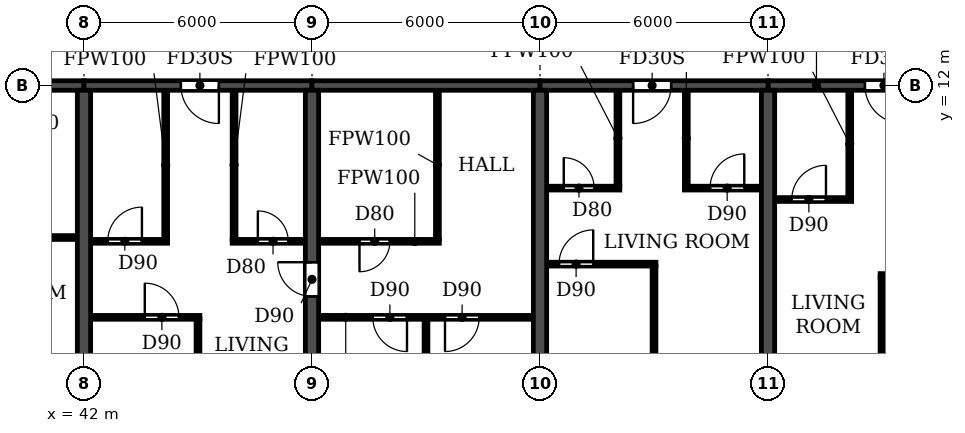
"""IFC4 building model, lengths in metres.
Left out: names, types, materials, properties, quantities, classifications, styles, units other than length and angle.
Written with IfcOpenShell. Run it as: python <this file> out.ifc"""

import sys

from ifc_helpers import new_model, si_unit, direction, frame, frame_2d, origin, place, context, subcontext, project, spatial, rectangle, extrude, element, fill, save


model = new_model("IFC4")
c1 = context("Model", 3, precision=1e-05, world=origin(), true_north=direction((0.0, 1.0)))
c2 = subcontext(c1, "Body", "Model", "MODEL_VIEW")
j1 = project(units=[si_unit("LENGTHUNIT", "METRE"), si_unit("PLANEANGLEUNIT", "RADIAN")], contexts=[c1])
p1 = place(None, origin())
s1 = spatial("IfcSite", under=j1, at=p1, CompositionType="ELEMENT")
p2 = place(p1, origin())
s2 = spatial("IfcBuilding", under=s1, at=p2, CompositionType="ELEMENT")
p3 = place(p2, frame((0.0, 0.0, 102.6)))
s3 = spatial("IfcBuildingStorey", under=s2, at=p3, CompositionType="ELEMENT", Elevation=102.6)
p4 = place(p3, frame((42.0, 0.2, 0.0), z_axis=(0.0, 0.0, 1.0), x_axis=(0.0, 1.0, 0.0)))
e1 = element("IfcWall", 1, at=p4, inside=s3, PredefinedType="SHEAR", context=c2, shape_type="SweptSolid", body=[
    extrude(rectangle(XDim=11.675, YDim=0.35, at=frame_2d((5.837, 0.0))), origin(), (0.0, 0.0, 1.0), 3.0),
])
p5 = place(p3, frame((48.0, 0.2, 0.0), z_axis=(0.0, 0.0, 1.0), x_axis=(0.0, 1.0, 0.0)))
e2 = element("IfcWall", 2, at=p5, inside=s3, PredefinedType="SHEAR", context=c2, shape_type="SweptSolid", body=[
    extrude(rectangle(XDim=11.675, YDim=0.35, at=frame_2d((5.837, 0.0))), origin(), (0.0, 0.0, 1.0), 3.0),
])
p6 = place(p5, frame((6.25, 0.0, 0.0)))
e3 = element("IfcOpeningElement", 3, at=p6, cuts=e2, PredefinedType="OPENING", context=c2, shape_type="SweptSolid", body=[
    extrude(rectangle(XDim=0.9, YDim=2.1, at=frame_2d((0.45, 1.05))), frame((0.0, 0.185, 0.0), z_axis=(0.0, -1.0, 0.0), x_axis=(1.0, 0.0, 0.0)), (0.0, 0.0, 1.0), 0.37),
])
for number, where, z_axis, x_axis in (
    (4, (54.0, 0.2, 0.0), (0.0, 0.0, 1.0), (0.0, 1.0, 0.0)),
    (5, (60.0, 0.2, 0.0), (0.0, 0.0, 1.0), (0.0, 1.0, 0.0)),
):
    element("IfcWall", number, at=place(p3, frame(where, z_axis=z_axis, x_axis=x_axis)), inside=s3, PredefinedType="SHEAR", context=c2, shape_type="SweptSolid", body=[
        extrude(rectangle(XDim=11.675, YDim=0.35, at=frame_2d((5.837, 0.0))), origin(), (0.0, 0.0, 1.0), 3.0),
    ])
p7 = place(p3, frame((36.0, 12.0, 0.0), z_axis=(0.0, 0.0, 1.0), x_axis=(1.0, 0.0, 0.0)))
e6 = element("IfcWall", 6, at=p7, inside=s3, PredefinedType="SHEAR", context=c2, shape_type="SweptSolid", body=[
    extrude(rectangle(XDim=6.0, YDim=0.25, at=frame_2d((3.0, 0.0))), origin(), (0.0, 0.0, 1.0), 2.4),
])
p8 = place(p7, frame((2.45, 0.0, 0.0)))
e7 = element("IfcOpeningElement", 7, at=p8, cuts=e6, PredefinedType="OPENING", context=c2, shape_type="SweptSolid", body=[
    extrude(rectangle(XDim=1.0, YDim=2.1, at=frame_2d((0.5, 1.05))), frame((0.0, 0.135, 0.0), z_axis=(0.0, -1.0, 0.0), x_axis=(1.0, 0.0, 0.0)), (0.0, 0.0, 1.0), 0.27),
])
p9 = place(p3, frame((42.0, 12.0, 0.0), z_axis=(0.0, 0.0, 1.0), x_axis=(1.0, 0.0, 0.0)))
e8 = element("IfcWall", 8, at=p9, inside=s3, PredefinedType="SHEAR", context=c2, shape_type="SweptSolid", body=[
    extrude(rectangle(XDim=6.0, YDim=0.25, at=frame_2d((3.0, 0.0))), origin(), (0.0, 0.0, 1.0), 2.4),
])
p10 = place(p9, frame((2.55, 0.0, 0.0)))
e9 = element("IfcOpeningElement", 9, at=p10, cuts=e8, PredefinedType="OPENING", context=c2, shape_type="SweptSolid", body=[
    extrude(rectangle(XDim=1.0, YDim=2.1, at=frame_2d((0.5, 1.05))), frame((0.0, 0.135, 0.0), z_axis=(0.0, -1.0, 0.0), x_axis=(1.0, 0.0, 0.0)), (0.0, 0.0, 1.0), 0.27),
])
p11 = place(p3, frame((48.0, 12.0, 0.0), z_axis=(0.0, 0.0, 1.0), x_axis=(1.0, 0.0, 0.0)))
e10 = element("IfcWall", 10, at=p11, inside=s3, PredefinedType="SHEAR", context=c2, shape_type="SweptSolid", body=[
    extrude(rectangle(XDim=6.0, YDim=0.25, at=frame_2d((3.0, 0.0))), origin(), (0.0, 0.0, 1.0), 2.4),
])
p12 = place(p3, frame((54.0, 12.0, 0.0), z_axis=(0.0, 0.0, 1.0), x_axis=(1.0, 0.0, 0.0)))
e11 = element("IfcWall", 11, at=p12, inside=s3, PredefinedType="SHEAR", context=c2, shape_type="SweptSolid", body=[
    extrude(rectangle(XDim=6.0, YDim=0.25, at=frame_2d((3.0, 0.0))), origin(), (0.0, 0.0, 1.0), 2.4),
])
p13 = place(p12, frame((2.45, 0.0, 0.0)))
e12 = element("IfcOpeningElement", 12, at=p13, cuts=e11, PredefinedType="OPENING", context=c2, shape_type="SweptSolid", body=[
    extrude(rectangle(XDim=1.0, YDim=2.1, at=frame_2d((0.5, 1.05))), frame((0.0, 0.135, 0.0), z_axis=(0.0, -1.0, 0.0), x_axis=(1.0, 0.0, 0.0)), (0.0, 0.0, 1.0), 0.27),
])
p14 = place(p3, frame((60.0, 12.0, 0.0), z_axis=(0.0, 0.0, 1.0), x_axis=(1.0, 0.0, 0.0)))
e13 = element("IfcWall", 13, at=p14, inside=s3, PredefinedType="SHEAR", context=c2, shape_type="SweptSolid", body=[
    extrude(rectangle(XDim=6.0, YDim=0.25, at=frame_2d((3.0, 0.0))), origin(), (0.0, 0.0, 1.0), 2.4),
])
p15 = place(p14, frame((2.55, 0.0, 0.0)))
e14 = element("IfcOpeningElement", 14, at=p15, cuts=e13, PredefinedType="OPENING", context=c2, shape_type="SweptSolid", body=[
    extrude(rectangle(XDim=1.0, YDim=2.1, at=frame_2d((0.5, 1.05))), frame((0.0, 0.135, 0.0), z_axis=(0.0, -1.0, 0.0), x_axis=(1.0, 0.0, 0.0)), (0.0, 0.0, 1.0), 0.27),
])
p16 = place(p3, frame((42.185, 5.9, 0.0), z_axis=(0.0, 0.0, 1.0), x_axis=(1.0, 0.0, 0.0)))
e15 = element("IfcWall", 15, at=p16, inside=s3, PredefinedType="PARTITIONING", context=c2, shape_type="SweptSolid", body=[
    extrude(rectangle(XDim=2.865, YDim=0.1, at=frame_2d((1.433, 0.0))), origin(), (0.0, 0.0, 1.0), 3.0),
])
p17 = place(p16, frame((1.415, 0.0, 0.0)))
e16 = element("IfcOpeningElement", 16, at=p17, cuts=e15, PredefinedType="OPENING", context=c2, shape_type="SweptSolid", body=[
    extrude(rectangle(XDim=0.9, YDim=2.1, at=frame_2d((0.45, 1.05))), frame((0.0, 0.06, 0.0), z_axis=(0.0, -1.0, 0.0), x_axis=(1.0, 0.0, 0.0)), (0.0, 0.0, 1.0), 0.12),
])
p18 = place(p3, frame((48.185, 5.9, 0.0), z_axis=(0.0, 0.0, 1.0), x_axis=(1.0, 0.0, 0.0)))
e17 = element("IfcWall", 17, at=p18, inside=s3, PredefinedType="PARTITIONING", context=c2, shape_type="SweptSolid", body=[
    extrude(rectangle(XDim=5.63, YDim=0.1, at=frame_2d((2.815, 0.0))), origin(), (0.0, 0.0, 1.0), 3.0),
])
p19 = place(p18, frame((1.415, 0.0, 0.0)))
e18 = element("IfcOpeningElement", 18, at=p19, cuts=e17, PredefinedType="OPENING", context=c2, shape_type="SweptSolid", body=[
    extrude(rectangle(XDim=0.9, YDim=2.1, at=frame_2d((0.45, 1.05))), frame((0.0, 0.06, 0.0), z_axis=(0.0, -1.0, 0.0), x_axis=(1.0, 0.0, 0.0)), (0.0, 0.0, 1.0), 0.12),
])
p20 = place(p18, frame((3.315, 0.0, 0.0)))
e19 = element("IfcOpeningElement", 19, at=p20, cuts=e17, PredefinedType="OPENING", context=c2, shape_type="SweptSolid", body=[
    extrude(rectangle(XDim=0.9, YDim=2.1, at=frame_2d((0.45, 1.05))), frame((0.0, 0.06, 0.0), z_axis=(0.0, -1.0, 0.0), x_axis=(1.0, 0.0, 0.0)), (0.0, 0.0, 1.0), 0.12),
])
p21 = place(p3, frame((62.95, 7.0, 0.0), z_axis=(0.0, 0.0, 1.0), x_axis=(1.0, 0.0, 0.0)))
e20 = element("IfcWall", 20, at=p21, inside=s3, PredefinedType="PARTITIONING", context=c2, shape_type="SweptSolid", body=[
    extrude(rectangle(XDim=2.865, YDim=0.1, at=frame_2d((1.433, 0.0))), origin(), (0.0, 0.0, 1.0), 3.0),
])
p22 = place(p21, frame((0.55, 0.0, 0.0)))
e21 = element("IfcOpeningElement", 21, at=p22, cuts=e20, PredefinedType="OPENING", context=c2, shape_type="SweptSolid", body=[
    extrude(rectangle(XDim=0.9, YDim=2.1, at=frame_2d((0.45, 1.05))), frame((0.0, 0.06, 0.0), z_axis=(0.0, -1.0, 0.0), x_axis=(1.0, 0.0, 0.0)), (0.0, 0.0, 1.0), 0.12),
])
p23 = place(p3, frame((54.185, 7.3, 0.0), z_axis=(0.0, 0.0, 1.0), x_axis=(1.0, 0.0, 0.0)))
e22 = element("IfcWall", 22, at=p23, inside=s3, PredefinedType="PARTITIONING", context=c2, shape_type="SweptSolid", body=[
    extrude(rectangle(XDim=2.865, YDim=0.1, at=frame_2d((1.433, 0.0))), origin(), (0.0, 0.0, 1.0), 3.0),
])
p24 = place(p23, frame((0.315, 0.0, 0.0)))
e23 = element("IfcOpeningElement", 23, at=p24, cuts=e22, PredefinedType="OPENING", context=c2, shape_type="SweptSolid", body=[
    extrude(rectangle(XDim=0.9, YDim=2.1, at=frame_2d((0.45, 1.05))), frame((0.0, 0.06, 0.0), z_axis=(0.0, -1.0, 0.0), x_axis=(1.0, 0.0, 0.0)), (0.0, 0.0, 1.0), 0.12),
])
p25 = place(p3, frame((42.185, 7.9, 0.0), z_axis=(0.0, 0.0, 1.0), x_axis=(1.0, 0.0, 0.0)))
e24 = element("IfcWall", 24, at=p25, inside=s3, PredefinedType="PARTITIONING", context=c2, shape_type="SweptSolid", body=[
    extrude(rectangle(XDim=2.015, YDim=0.1, at=frame_2d((1.007, 0.0))), origin(), (0.0, 0.0, 1.0), 3.0),
])
p26 = place(p25, frame((0.44, 0.0, 0.0)))
e25 = element("IfcOpeningElement", 25, at=p26, cuts=e24, PredefinedType="OPENING", context=c2, shape_type="SweptSolid", body=[
    extrude(rectangle(XDim=0.9, YDim=2.1, at=frame_2d((0.45, 1.05))), frame((0.0, 0.06, 0.0), z_axis=(0.0, -1.0, 0.0), x_axis=(1.0, 0.0, 0.0)), (0.0, 0.0, 1.0), 0.12),
])
p27 = place(p3, frame((45.9, 7.9, 0.0), z_axis=(0.0, 0.0, 1.0), x_axis=(1.0, 0.0, 0.0)))
e26 = element("IfcWall", 26, at=p27, inside=s3, PredefinedType="PARTITIONING", context=c2, shape_type="SweptSolid", body=[
    extrude(rectangle(XDim=1.915, YDim=0.1, at=frame_2d((0.958, 0.0))), origin(), (0.0, 0.0, 1.0), 3.0),
])
p28 = place(p27, frame((0.675, 0.0, 0.0)))
e27 = element("IfcOpeningElement", 27, at=p28, cuts=e26, PredefinedType="OPENING", context=c2, shape_type="SweptSolid", body=[
    extrude(rectangle(XDim=0.8, YDim=2.1, at=frame_2d((0.4, 1.05))), frame((0.0, 0.06, 0.0), z_axis=(0.0, -1.0, 0.0), x_axis=(1.0, 0.0, 0.0)), (0.0, 0.0, 1.0), 0.12),
])
p29 = place(p3, frame((48.185, 7.9, 0.0), z_axis=(0.0, 0.0, 1.0), x_axis=(1.0, 0.0, 0.0)))
e28 = element("IfcWall", 28, at=p29, inside=s3, PredefinedType="PARTITIONING", context=c2, shape_type="SweptSolid", body=[
    extrude(rectangle(XDim=3.165, YDim=0.1, at=frame_2d((1.583, 0.0))), origin(), (0.0, 0.0, 1.0), 3.0),
])
p30 = place(p29, frame((1.065, 0.0, 0.0)))
e29 = element("IfcOpeningElement", 29, at=p30, cuts=e28, PredefinedType="OPENING", context=c2, shape_type="SweptSolid", body=[
    extrude(rectangle(XDim=0.8, YDim=2.1, at=frame_2d((0.4, 1.05))), frame((0.0, 0.06, 0.0), z_axis=(0.0, -1.0, 0.0), x_axis=(1.0, 0.0, 0.0)), (0.0, 0.0, 1.0), 0.12),
])
p31 = place(p3, frame((39.8, 8.0, 0.0), z_axis=(0.0, 0.0, 1.0), x_axis=(1.0, 0.0, 0.0)))
e30 = element("IfcWall", 30, at=p31, inside=s3, PredefinedType="PARTITIONING", context=c2, shape_type="SweptSolid", body=[
    extrude(rectangle(XDim=2.015, YDim=0.1, at=frame_2d((1.007, 0.0))), origin(), (0.0, 0.0, 1.0), 3.0),
])
p32 = place(p3, frame((60.185, 9.0, 0.0), z_axis=(0.0, 0.0, 1.0), x_axis=(1.0, 0.0, 0.0)))
e31 = element("IfcWall", 31, at=p32, inside=s3, PredefinedType="PARTITIONING", context=c2, shape_type="SweptSolid", body=[
    extrude(rectangle(XDim=2.015, YDim=0.1, at=frame_2d((1.007, 0.0))), origin(), (0.0, 0.0, 1.0), 3.0),
])
p33 = place(p32, frame((0.44, 0.0, 0.0)))
e32 = element("IfcOpeningElement", 32, at=p33, cuts=e31, PredefinedType="OPENING", context=c2, shape_type="SweptSolid", body=[
    extrude(rectangle(XDim=0.9, YDim=2.1, at=frame_2d((0.45, 1.05))), frame((0.0, 0.06, 0.0), z_axis=(0.0, -1.0, 0.0), x_axis=(1.0, 0.0, 0.0)), (0.0, 0.0, 1.0), 0.12),
])
p34 = place(p3, frame((54.185, 9.3, 0.0), z_axis=(0.0, 0.0, 1.0), x_axis=(1.0, 0.0, 0.0)))
e33 = element("IfcWall", 33, at=p34, inside=s3, PredefinedType="PARTITIONING", context=c2, shape_type="SweptSolid", body=[
    extrude(rectangle(XDim=1.915, YDim=0.1, at=frame_2d((0.958, 0.0))), origin(), (0.0, 0.0, 1.0), 3.0),
])
p35 = place(p34, frame((0.44, 0.0, 0.0)))
e34 = element("IfcOpeningElement", 34, at=p35, cuts=e33, PredefinedType="OPENING", context=c2, shape_type="SweptSolid", body=[
    extrude(rectangle(XDim=0.8, YDim=2.1, at=frame_2d((0.4, 1.05))), frame((0.0, 0.06, 0.0), z_axis=(0.0, -1.0, 0.0), x_axis=(1.0, 0.0, 0.0)), (0.0, 0.0, 1.0), 0.12),
])
p36 = place(p3, frame((57.8, 9.3, 0.0), z_axis=(0.0, 0.0, 1.0), x_axis=(1.0, 0.0, 0.0)))
e35 = element("IfcWall", 35, at=p36, inside=s3, PredefinedType="PARTITIONING", context=c2, shape_type="SweptSolid", body=[
    extrude(rectangle(XDim=2.015, YDim=0.1, at=frame_2d((1.007, 0.0))), origin(), (0.0, 0.0, 1.0), 3.0),
])
p37 = place(p36, frame((0.675, 0.0, 0.0)))
e36 = element("IfcOpeningElement", 36, at=p37, cuts=e35, PredefinedType="OPENING", context=c2, shape_type="SweptSolid", body=[
    extrude(rectangle(XDim=0.9, YDim=2.1, at=frame_2d((0.45, 1.05))), frame((0.0, 0.06, 0.0), z_axis=(0.0, -1.0, 0.0), x_axis=(1.0, 0.0, 0.0)), (0.0, 0.0, 1.0), 0.12),
])
p38 = place(p3, frame((44.15, 7.95, 0.0), z_axis=(0.0, 0.0, 1.0), x_axis=(0.0, 1.0, 0.0)))
e37 = element("IfcWall", 37, at=p38, inside=s3, PredefinedType="PARTITIONING", context=c2, shape_type="SweptSolid", body=[
    extrude(rectangle(XDim=3.915, YDim=0.1, at=frame_2d((1.958, 0.0))), origin(), (0.0, 0.0, 1.0), 3.0),
])
p39 = place(p3, frame((45.0, 0.06, 0.0), z_axis=(0.0, 0.0, 1.0), x_axis=(0.0, 1.0, 0.0)))
e38 = element("IfcWall", 38, at=p39, inside=s3, PredefinedType="PARTITIONING", context=c2, shape_type="SweptSolid", body=[
    extrude(rectangle(XDim=5.79, YDim=0.1, at=frame_2d((2.895, 0.0))), origin(), (0.0, 0.0, 1.0), 3.0),
])
p40 = place(p3, frame((45.95, 7.95, 0.0), z_axis=(0.0, 0.0, 1.0), x_axis=(0.0, 1.0, 0.0)))
e39 = element("IfcWall", 39, at=p40, inside=s3, PredefinedType="PARTITIONING", context=c2, shape_type="SweptSolid", body=[
    extrude(rectangle(XDim=3.915, YDim=0.1, at=frame_2d((1.958, 0.0))), origin(), (0.0, 0.0, 1.0), 3.0),
])
p41 = place(p3, frame((51.0, 0.06, 0.0), z_axis=(0.0, 0.0, 1.0), x_axis=(0.0, 1.0, 0.0)))
e40 = element("IfcWall", 40, at=p41, inside=s3, PredefinedType="PARTITIONING", context=c2, shape_type="SweptSolid", body=[
    extrude(rectangle(XDim=5.79, YDim=0.1, at=frame_2d((2.895, 0.0))), origin(), (0.0, 0.0, 1.0), 3.0),
])
p42 = place(p3, frame((51.3, 7.95, 0.0), z_axis=(0.0, 0.0, 1.0), x_axis=(0.0, 1.0, 0.0)))
e41 = element("IfcWall", 41, at=p42, inside=s3, PredefinedType="PARTITIONING", context=c2, shape_type="SweptSolid", body=[
    extrude(rectangle(XDim=3.915, YDim=0.1, at=frame_2d((1.958, 0.0))), origin(), (0.0, 0.0, 1.0), 3.0),
])
p43 = place(p3, frame((56.05, 9.35, 0.0), z_axis=(0.0, 0.0, 1.0), x_axis=(0.0, 1.0, 0.0)))
e42 = element("IfcWall", 42, at=p43, inside=s3, PredefinedType="PARTITIONING", context=c2, shape_type="SweptSolid", body=[
    extrude(rectangle(XDim=2.515, YDim=0.1, at=frame_2d((1.257, 0.0))), origin(), (0.0, 0.0, 1.0), 3.0),
])
p44 = place(p3, frame((57.0, 0.06, 0.0), z_axis=(0.0, 0.0, 1.0), x_axis=(0.0, 1.0, 0.0)))
e43 = element("IfcWall", 43, at=p44, inside=s3, PredefinedType="PARTITIONING", context=c2, shape_type="SweptSolid", body=[
    extrude(rectangle(XDim=7.19, YDim=0.1, at=frame_2d((3.595, 0.0))), origin(), (0.0, 0.0, 1.0), 3.0),
])
p45 = place(p3, frame((57.85, 9.35, 0.0), z_axis=(0.0, 0.0, 1.0), x_axis=(0.0, 1.0, 0.0)))
e44 = element("IfcWall", 44, at=p45, inside=s3, PredefinedType="PARTITIONING", context=c2, shape_type="SweptSolid", body=[
    extrude(rectangle(XDim=2.515, YDim=0.1, at=frame_2d((1.257, 0.0))), origin(), (0.0, 0.0, 1.0), 3.0),
])
p46 = place(p3, frame((62.15, 9.05, 0.0), z_axis=(0.0, 0.0, 1.0), x_axis=(0.0, 1.0, 0.0)))
e45 = element("IfcWall", 45, at=p46, inside=s3, PredefinedType="PARTITIONING", context=c2, shape_type="SweptSolid", body=[
    extrude(rectangle(XDim=2.815, YDim=0.1, at=frame_2d((1.407, 0.0))), origin(), (0.0, 0.0, 1.0), 3.0),
])
p47 = place(p3, frame((63.0, 0.06, 0.0), z_axis=(0.0, 0.0, 1.0), x_axis=(0.0, 1.0, 0.0)))
e46 = element("IfcWall", 46, at=p47, inside=s3, PredefinedType="PARTITIONING", context=c2, shape_type="SweptSolid", body=[
    extrude(rectangle(XDim=6.89, YDim=0.1, at=frame_2d((3.445, 0.0))), origin(), (0.0, 0.0, 1.0), 3.0),
])
p48 = place(p30, frame((0.8, 0.0, 0.0), z_axis=(0.0, 0.0, 1.0), x_axis=(-1.0, 0.0, 0.0)))
e47 = element("IfcDoor", 47, at=p48, inside=s3, OperationType="SINGLE_SWING_RIGHT", PredefinedType="DOOR", context=c2, shape_type="SweptSolid", body=[
    extrude(rectangle(XDim=0.8, YDim=2.1, at=frame_2d((0.4, 1.05))), frame((0.0, 0.025, 0.0), z_axis=(0.0, -1.0, 0.0), x_axis=(1.0, 0.0, 0.0)), (0.0, 0.0, 1.0), 0.05),
])
fill(e29, e47)
p49 = place(p19, frame((0.9, 0.0, 0.0), z_axis=(0.0, 0.0, 1.0), x_axis=(-1.0, 0.0, 0.0)))
e48 = element("IfcDoor", 48, at=p49, inside=s3, OperationType="SINGLE_SWING_LEFT", PredefinedType="DOOR", context=c2, shape_type="SweptSolid", body=[
    extrude(rectangle(XDim=0.9, YDim=2.1, at=frame_2d((0.45, 1.05))), frame((0.0, 0.025, 0.0), z_axis=(0.0, -1.0, 0.0), x_axis=(1.0, 0.0, 0.0)), (0.0, 0.0, 1.0), 0.05),
])
fill(e18, e48)
p50 = place(p20, frame((0.9, 0.0, 0.0), z_axis=(0.0, 0.0, 1.0), x_axis=(-1.0, 0.0, 0.0)))
e49 = element("IfcDoor", 49, at=p50, inside=s3, OperationType="SINGLE_SWING_RIGHT", PredefinedType="DOOR", context=c2, shape_type="SweptSolid", body=[
    extrude(rectangle(XDim=0.9, YDim=2.1, at=frame_2d((0.45, 1.05))), frame((0.0, 0.025, 0.0), z_axis=(0.0, -1.0, 0.0), x_axis=(1.0, 0.0, 0.0)), (0.0, 0.0, 1.0), 0.05),
])
fill(e19, e49)
p51 = place(p26, origin())
e50 = element("IfcDoor", 50, at=p51, inside=s3, OperationType="SINGLE_SWING_RIGHT", PredefinedType="DOOR", context=c2, shape_type="SweptSolid", body=[
    extrude(rectangle(XDim=0.9, YDim=2.1, at=frame_2d((0.45, 1.05))), frame((0.0, 0.025, 0.0), z_axis=(0.0, -1.0, 0.0), x_axis=(1.0, 0.0, 0.0)), (0.0, 0.0, 1.0), 0.05),
])
fill(e25, e50)
p52 = place(p17, origin())
e51 = element("IfcDoor", 51, at=p52, inside=s3, OperationType="SINGLE_SWING_LEFT", PredefinedType="DOOR", context=c2, shape_type="SweptSolid", body=[
    extrude(rectangle(XDim=0.9, YDim=2.1, at=frame_2d((0.45, 1.05))), frame((0.0, 0.025, 0.0), z_axis=(0.0, -1.0, 0.0), x_axis=(1.0, 0.0, 0.0)), (0.0, 0.0, 1.0), 0.05),
])
fill(e16, e51)
p53 = place(p10, frame((1.0, 0.0, 0.0), z_axis=(0.0, 0.0, 1.0), x_axis=(-1.0, 0.0, 0.0)))
e52 = element("IfcDoor", 52, at=p53, inside=s3, OperationType="SINGLE_SWING_LEFT", PredefinedType="DOOR", context=c2, shape_type="SweptSolid", body=[
    extrude(rectangle(XDim=1.0, YDim=2.1, at=frame_2d((0.5, 1.05))), frame((0.0, 0.025, 0.0), z_axis=(0.0, -1.0, 0.0), x_axis=(1.0, 0.0, 0.0)), (0.0, 0.0, 1.0), 0.05),
])
fill(e9, e52)
p54 = place(p28, origin())
e53 = element("IfcDoor", 53, at=p54, inside=s3, OperationType="SINGLE_SWING_LEFT", PredefinedType="DOOR", context=c2, shape_type="SweptSolid", body=[
    extrude(rectangle(XDim=0.8, YDim=2.1, at=frame_2d((0.4, 1.05))), frame((0.0, 0.025, 0.0), z_axis=(0.0, -1.0, 0.0), x_axis=(1.0, 0.0, 0.0)), (0.0, 0.0, 1.0), 0.05),
])
fill(e27, e53)
p55 = place(p6, origin())
e54 = element("IfcDoor", 54, at=p55, inside=s3, OperationType="SINGLE_SWING_RIGHT", PredefinedType="DOOR", context=c2, shape_type="SweptSolid", body=[
    extrude(rectangle(XDim=0.9, YDim=2.1, at=frame_2d((0.45, 1.05))), frame((0.0, 0.025, 0.0), z_axis=(0.0, -1.0, 0.0), x_axis=(1.0, 0.0, 0.0)), (0.0, 0.0, 1.0), 0.05),
])
fill(e3, e54)
p56 = place(p24, origin())
e55 = element("IfcDoor", 55, at=p56, inside=s3, OperationType="SINGLE_SWING_RIGHT", PredefinedType="DOOR", context=c2, shape_type="SweptSolid", body=[
    extrude(rectangle(XDim=0.9, YDim=2.1, at=frame_2d((0.45, 1.05))), frame((0.0, 0.025, 0.0), z_axis=(0.0, -1.0, 0.0), x_axis=(1.0, 0.0, 0.0)), (0.0, 0.0, 1.0), 0.05),
])
fill(e23, e55)
p57 = place(p35, origin())
e56 = element("IfcDoor", 56, at=p57, inside=s3, OperationType="SINGLE_SWING_LEFT", PredefinedType="DOOR", context=c2, shape_type="SweptSolid", body=[
    extrude(rectangle(XDim=0.8, YDim=2.1, at=frame_2d((0.4, 1.05))), frame((0.0, 0.025, 0.0), z_axis=(0.0, -1.0, 0.0), x_axis=(1.0, 0.0, 0.0)), (0.0, 0.0, 1.0), 0.05),
])
fill(e34, e56)
p58 = place(p13, frame((1.0, 0.0, 0.0), z_axis=(0.0, 0.0, 1.0), x_axis=(-1.0, 0.0, 0.0)))
e57 = element("IfcDoor", 57, at=p58, inside=s3, OperationType="SINGLE_SWING_RIGHT", PredefinedType="DOOR", context=c2, shape_type="SweptSolid", body=[
    extrude(rectangle(XDim=1.0, YDim=2.1, at=frame_2d((0.5, 1.05))), frame((0.0, 0.025, 0.0), z_axis=(0.0, -1.0, 0.0), x_axis=(1.0, 0.0, 0.0)), (0.0, 0.0, 1.0), 0.05),
])
fill(e12, e57)
p59 = place(p37, origin())
e58 = element("IfcDoor", 58, at=p59, inside=s3, OperationType="SINGLE_SWING_RIGHT", PredefinedType="DOOR", context=c2, shape_type="SweptSolid", body=[
    extrude(rectangle(XDim=0.9, YDim=2.1, at=frame_2d((0.45, 1.05))), frame((0.0, 0.025, 0.0), z_axis=(0.0, -1.0, 0.0), x_axis=(1.0, 0.0, 0.0)), (0.0, 0.0, 1.0), 0.05),
])
fill(e36, e58)
p60 = place(p33, origin())
e59 = element("IfcDoor", 59, at=p60, inside=s3, OperationType="SINGLE_SWING_RIGHT", PredefinedType="DOOR", context=c2, shape_type="SweptSolid", body=[
    extrude(rectangle(XDim=0.9, YDim=2.1, at=frame_2d((0.45, 1.05))), frame((0.0, 0.025, 0.0), z_axis=(0.0, -1.0, 0.0), x_axis=(1.0, 0.0, 0.0)), (0.0, 0.0, 1.0), 0.05),
])
fill(e32, e59)
p61 = place(p15, frame((1.0, 0.0, 0.0), z_axis=(0.0, 0.0, 1.0), x_axis=(-1.0, 0.0, 0.0)))
e60 = element("IfcDoor", 60, at=p61, inside=s3, OperationType="SINGLE_SWING_LEFT", PredefinedType="DOOR", context=c2, shape_type="SweptSolid", body=[
    extrude(rectangle(XDim=1.0, YDim=2.1, at=frame_2d((0.5, 1.05))), frame((0.0, 0.025, 0.0), z_axis=(0.0, -1.0, 0.0), x_axis=(1.0, 0.0, 0.0)), (0.0, 0.0, 1.0), 0.05),
])
fill(e14, e60)
save(model, sys.argv[1])
